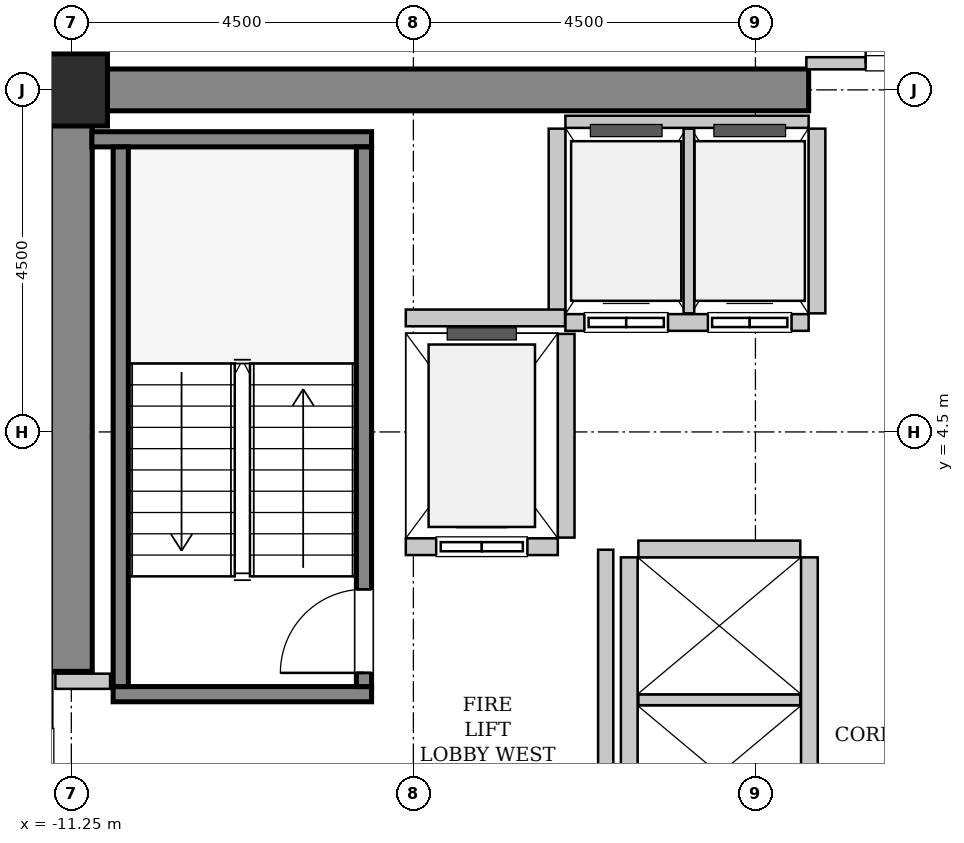
"""IFC4 building model, lengths in metres.
Left out: names, types, materials, properties, quantities, classifications, styles, units other than length and angle.
Written with IfcOpenShell. Run it as: python <this file> out.ifc"""

import sys

from ifc_helpers import new_model, si_unit, direction, frame, frame_2d, origin, origin_2d, place, context, subcontext, project, spatial, rectangle, hollow_rectangle, extrude, source, transform, mapped, element, fill, save


model = new_model("IFC4")
c1 = context("Model", 3, precision=1e-05, world=origin(), true_north=direction((0.0, 1.0)))
c2 = subcontext(c1, "Body", "Model", "MODEL_VIEW")
j1 = project(units=[si_unit("LENGTHUNIT", "METRE"), si_unit("PLANEANGLEUNIT", "RADIAN")], contexts=[c1])
p1 = place(None, origin())
s1 = spatial("IfcSite", under=j1, at=p1, CompositionType="ELEMENT")
p2 = place(p1, origin())
s2 = spatial("IfcBuilding", under=s1, at=p2, CompositionType="ELEMENT")
p3 = place(p2, frame((0.0, 0.0, 136.4)))
s3 = spatial("IfcBuildingStorey", under=s2, at=p3, CompositionType="ELEMENT", Elevation=136.4)
m1 = source(origin(), c2, "Body", "SweptSolid", [
    extrude(rectangle(XDim=9.975, YDim=0.55, at=frame_2d((4.987, 0.0))), origin(), (0.0, 0.0, 1.0), 3.8),
])
p4 = place(p3, frame((-11.525, 9.0, 0.0), z_axis=(0.0, 0.0, 1.0), x_axis=(1.0, 0.0, 0.0)))
e1 = element("IfcWall", 1, at=p4, inside=s3, PredefinedType="SHEAR", context=c2, shape_type="MappedRepresentation", body=[
    mapped(m1, transform((0.0, 0.0, 0.0), x_axis=(1.0, 0.0, 0.0), y_axis=(0.0, 1.0, 0.0), z_axis=(0.0, 0.0, 1.0), scale=1.0)),
])
m2 = source(origin(), c2, "Body", "SweptSolid", [
    extrude(rectangle(XDim=7.375, YDim=0.55, at=frame_2d((3.688, 0.0))), origin(), (0.0, 0.0, 1.0), 3.8),
])
p5 = place(p3, frame((-11.25, 1.35, 0.0), z_axis=(0.0, 0.0, 1.0), x_axis=(0.0, 1.0, 0.0)))
e2 = element("IfcWall", 2, at=p5, inside=s3, PredefinedType="SHEAR", context=c2, shape_type="MappedRepresentation", body=[
    mapped(m2, transform((0.0, 0.0, 0.0), x_axis=(1.0, 0.0, 0.0), y_axis=(0.0, 1.0, 0.0), z_axis=(0.0, 0.0, 1.0), scale=1.0)),
])
m3 = source(origin(), c2, "Body", "SweptSolid", [
    extrude(hollow_rectangle(XDim=0.95, YDim=0.95, WallThickness=0.045, InnerFilletRadius=0.045, OuterFilletRadius=0.09, at=origin_2d()), origin(), (0.0, 0.0, 1.0), 3.8),
])
p6 = place(p3, frame((-11.25, 9.0, 0.0), z_axis=(0.0, 0.0, 1.0), x_axis=(1.0, 0.0, 0.0)))
e3 = element("IfcColumn", 3, at=p6, inside=s3, PredefinedType="COLUMN", context=c2, shape_type="MappedRepresentation", body=[
    mapped(m3, transform((0.0, 0.0, 0.0), x_axis=(1.0, 0.0, 0.0), y_axis=(0.0, 1.0, 0.0), z_axis=(0.0, 0.0, 1.0), scale=1.0)),
])
m4 = source(origin(), c2, "Body", "SweptSolid", [
    extrude(rectangle(XDim=3.4, YDim=0.2, at=frame_2d((1.7, 0.0))), origin(), (0.0, 0.0, 1.0), 3.8),
])
p7 = place(p3, frame((-7.3, 1.05, 0.0), z_axis=(0.0, 0.0, 1.0), x_axis=(-1.0, 0.0, 0.0)))
e4 = element("IfcWall", 4, at=p7, inside=s3, PredefinedType="SOLIDWALL", context=c2, shape_type="MappedRepresentation", body=[
    mapped(m4, transform((0.0, 0.0, 0.0), x_axis=(1.0, 0.0, 0.0), y_axis=(0.0, 1.0, 0.0), z_axis=(0.0, 0.0, 1.0), scale=1.0)),
])
m5 = source(origin(), c2, "Body", "SweptSolid", [
    extrude(rectangle(XDim=3.68, YDim=0.2, at=frame_2d((1.84, 0.0))), origin(), (0.0, 0.0, 1.0), 3.8),
])
p8 = place(p3, frame((-7.3, 8.35, 0.0), z_axis=(0.0, 0.0, 1.0), x_axis=(-1.0, 0.0, 0.0)))
e5 = element("IfcWall", 5, at=p8, inside=s3, PredefinedType="SOLIDWALL", context=c2, shape_type="MappedRepresentation", body=[
    mapped(m5, transform((0.0, 0.0, 0.0), x_axis=(1.0, 0.0, 0.0), y_axis=(0.0, 1.0, 0.0), z_axis=(0.0, 0.0, 1.0), scale=1.0)),
])
m6 = source(origin(), c2, "Body", "SweptSolid", [
    extrude(rectangle(XDim=7.1, YDim=0.2, at=frame_2d((3.55, 0.0))), origin(), (0.0, 0.0, 1.0), 3.8),
])
p9 = place(p3, frame((-7.4, 1.15, 0.0), z_axis=(0.0, 0.0, 1.0), x_axis=(0.0, 1.0, 0.0)))
e6 = element("IfcWall", 6, at=p9, inside=s3, PredefinedType="SOLIDWALL", context=c2, shape_type="MappedRepresentation", body=[
    mapped(m6, transform((0.0, 0.0, 0.0), x_axis=(1.0, 0.0, 0.0), y_axis=(0.0, 1.0, 0.0), z_axis=(0.0, 0.0, 1.0), scale=1.0)),
])
p10 = place(p9, frame((0.18, 0.0, 0.0)))
e7 = element("IfcOpeningElement", 7, at=p10, cuts=e6, PredefinedType="OPENING", context=c2, shape_type="SweptSolid", body=[
    extrude(rectangle(XDim=1.1, YDim=2.15, at=frame_2d((0.55, 1.075))), frame((0.0, 0.11, 0.0), z_axis=(0.0, -1.0, 0.0), x_axis=(1.0, 0.0, 0.0)), (0.0, 0.0, 1.0), 0.22),
])
p11 = place(p3, frame((-10.6, 1.15, 0.0), z_axis=(0.0, 0.0, 1.0), x_axis=(0.0, 1.0, 0.0)))
e8 = element("IfcWall", 8, at=p11, inside=s3, PredefinedType="SOLIDWALL", context=c2, shape_type="MappedRepresentation", body=[
    mapped(m6, transform((0.0, 0.0, 0.0), x_axis=(1.0, 0.0, 0.0), y_axis=(0.0, 1.0, 0.0), z_axis=(0.0, 0.0, 1.0), scale=1.0)),
])
m7 = source(origin(), c2, "Body", "SweptSolid", [
    extrude(rectangle(XDim=2.0, YDim=0.22, at=frame_2d((1.0, 0.0))), origin(), (0.0, 0.0, 1.0), 3.535),
])
p12 = place(p3, frame((-6.85, 2.99, 0.0), z_axis=(0.0, 0.0, 1.0), x_axis=(1.0, 0.0, 0.0)))
e9 = element("IfcWall", 9, at=p12, inside=s3, PredefinedType="SOLIDWALL", context=c2, shape_type="MappedRepresentation", body=[
    mapped(m7, transform((0.0, 0.0, 0.0), x_axis=(1.0, 0.0, 0.0), y_axis=(0.0, 1.0, 0.0), z_axis=(0.0, 0.0, 1.0), scale=1.0)),
])
p13 = place(p12, frame((0.4, 0.0, 0.0)))
e10 = element("IfcOpeningElement", 10, at=p13, cuts=e9, PredefinedType="OPENING", context=c2, shape_type="SweptSolid", body=[
    extrude(rectangle(XDim=1.2, YDim=2.2, at=frame_2d((0.6, 1.1))), frame((0.0, 0.12, 0.0), z_axis=(0.0, -1.0, 0.0), x_axis=(1.0, 0.0, 0.0)), (0.0, 0.0, 1.0), 0.24),
])
m8 = source(origin(), c2, "Body", "SweptSolid", [
    extrude(rectangle(XDim=2.68, YDim=0.22, at=frame_2d((1.34, 0.0))), origin(), (0.0, 0.0, 1.0), 3.535),
])
p14 = place(p3, frame((-4.74, 3.11, 0.0), z_axis=(0.0, 0.0, 1.0), x_axis=(0.0, 1.0, 0.0)))
e11 = element("IfcWall", 11, at=p14, inside=s3, PredefinedType="SOLIDWALL", context=c2, shape_type="MappedRepresentation", body=[
    mapped(m8, transform((0.0, 0.0, 0.0), x_axis=(1.0, 0.0, 0.0), y_axis=(0.0, 1.0, 0.0), z_axis=(0.0, 0.0, 1.0), scale=1.0)),
])
m9 = source(origin(), c2, "Body", "SweptSolid", [
    extrude(rectangle(XDim=3.2, YDim=0.22, at=frame_2d((1.6, 0.0))), origin(), (0.0, 0.0, 1.0), 3.535),
])
p15 = place(p3, frame((-4.75, 5.94, 0.0), z_axis=(0.0, 0.0, 1.0), x_axis=(1.0, 0.0, 0.0)))
e12 = element("IfcWall", 12, at=p15, inside=s3, PredefinedType="SOLIDWALL", context=c2, shape_type="MappedRepresentation", body=[
    mapped(m9, transform((0.0, 0.0, 0.0), x_axis=(1.0, 0.0, 0.0), y_axis=(0.0, 1.0, 0.0), z_axis=(0.0, 0.0, 1.0), scale=1.0)),
])
p16 = place(p15, frame((0.25, 0.0, 0.0)))
e13 = element("IfcOpeningElement", 13, at=p16, cuts=e12, PredefinedType="OPENING", context=c2, shape_type="SweptSolid", body=[
    extrude(rectangle(XDim=1.1, YDim=2.2, at=frame_2d((0.55, 1.1))), frame((0.0, 0.12, 0.0), z_axis=(0.0, -1.0, 0.0), x_axis=(1.0, 0.0, 0.0)), (0.0, 0.0, 1.0), 0.24),
])
p17 = place(p15, frame((1.875, 0.0, 0.0)))
e14 = element("IfcOpeningElement", 14, at=p17, cuts=e12, PredefinedType="OPENING", context=c2, shape_type="SweptSolid", body=[
    extrude(rectangle(XDim=1.1, YDim=2.2, at=frame_2d((0.55, 1.1))), frame((0.0, 0.12, 0.0), z_axis=(0.0, -1.0, 0.0), x_axis=(1.0, 0.0, 0.0)), (0.0, 0.0, 1.0), 0.24),
])
m10 = source(origin(), c2, "Body", "SweptSolid", [
    extrude(rectangle(XDim=3.2, YDim=0.16, at=frame_2d((1.6, 0.0))), origin(), (0.0, 0.0, 1.0), 2.425),
])
p18 = place(p3, frame((-1.55, 8.58, 0.0), z_axis=(0.0, 0.0, 1.0), x_axis=(-1.0, 0.0, 0.0)))
e15 = element("IfcWall", 15, at=p18, inside=s3, PredefinedType="PARTITIONING", context=c2, shape_type="MappedRepresentation", body=[
    mapped(m10, transform((0.0, 0.0, 0.0), x_axis=(1.0, 0.0, 0.0), y_axis=(0.0, 1.0, 0.0), z_axis=(0.0, 0.0, 1.0), scale=1.0)),
])
m11 = source(origin(), c2, "Body", "SweptSolid", [
    extrude(rectangle(XDim=2.43, YDim=0.22, at=frame_2d((1.215, 0.0))), origin(), (0.0, 0.0, 1.0), 3.535),
])
p19 = place(p3, frame((-4.86, 8.49, 0.0), z_axis=(0.0, 0.0, 1.0), x_axis=(0.0, -1.0, 0.0)))
e16 = element("IfcWall", 16, at=p19, inside=s3, PredefinedType="SOLIDWALL", context=c2, shape_type="MappedRepresentation", body=[
    mapped(m11, transform((0.0, 0.0, 0.0), x_axis=(1.0, 0.0, 0.0), y_axis=(0.0, 1.0, 0.0), z_axis=(0.0, 0.0, 1.0), scale=1.0)),
])
m12 = source(origin(), c2, "Body", "SweptSolid", [
    extrude(rectangle(XDim=2.43, YDim=0.14, at=frame_2d((1.215, 0.0))), origin(), (0.0, 0.0, 1.0), 3.535),
])
p20 = place(p3, frame((-3.125, 6.06, 0.0), z_axis=(0.0, 0.0, 1.0), x_axis=(0.0, 1.0, 0.0)))
e17 = element("IfcWall", 17, at=p20, inside=s3, PredefinedType="PARTITIONING", context=c2, shape_type="MappedRepresentation", body=[
    mapped(m12, transform((0.0, 0.0, 0.0), x_axis=(1.0, 0.0, 0.0), y_axis=(0.0, 1.0, 0.0), z_axis=(0.0, 0.0, 1.0), scale=1.0)),
])
p21 = place(p3, frame((-1.44, 6.06, 0.0), z_axis=(0.0, 0.0, 1.0), x_axis=(0.0, 1.0, 0.0)))
e18 = element("IfcWall", 18, at=p21, inside=s3, PredefinedType="SOLIDWALL", context=c2, shape_type="MappedRepresentation", body=[
    mapped(m11, transform((0.0, 0.0, 0.0), x_axis=(1.0, 0.0, 0.0), y_axis=(0.0, 1.0, 0.0), z_axis=(0.0, 0.0, 1.0), scale=1.0)),
])
m13 = source(origin(), c2, "Body", "SweptSolid", [
    extrude(rectangle(XDim=5.7, YDim=0.22, at=frame_2d((2.85, 0.0))), origin(), (0.0, 0.0, 1.0), 3.535),
])
for number, where, z_axis, x_axis in (
    (19, (-1.54, -2.85, 0.0), (0.0, 0.0, 1.0), (0.0, 1.0, 0.0)),
    (20, (-3.91, 2.85, 0.0), (0.0, 0.0, 1.0), (0.0, -1.0, 0.0)),
):
    element("IfcWall", number, at=place(p3, frame(where, z_axis=z_axis, x_axis=x_axis)), inside=s3, PredefinedType="SOLIDWALL", context=c2, shape_type="MappedRepresentation", body=[
        mapped(m13, transform((0.0, 0.0, 0.0), x_axis=(1.0, 0.0, 0.0), y_axis=(0.0, 1.0, 0.0), z_axis=(0.0, 0.0, 1.0), scale=1.0)),
    ])
m14 = source(origin(), c2, "Body", "SweptSolid", [
    extrude(rectangle(XDim=2.13, YDim=0.14, at=frame_2d((1.065, 0.0))), origin(), (0.0, 0.0, 1.0), 3.535),
])
p22 = place(p3, frame((-3.79, 0.975, 0.0), z_axis=(0.0, 0.0, 1.0), x_axis=(1.0, 0.0, 0.0)))
e21 = element("IfcWall", 21, at=p22, inside=s3, PredefinedType="PARTITIONING", context=c2, shape_type="MappedRepresentation", body=[
    mapped(m14, transform((0.0, 0.0, 0.0), x_axis=(1.0, 0.0, 0.0), y_axis=(0.0, 1.0, 0.0), z_axis=(0.0, 0.0, 1.0), scale=1.0)),
])
m15 = source(origin(), c2, "Body", "SweptSolid", [
    extrude(rectangle(XDim=2.13, YDim=0.22, at=frame_2d((1.065, 0.0))), origin(), (0.0, 0.0, 1.0), 3.535),
])
p23 = place(p3, frame((-1.66, 2.96, 0.0), z_axis=(0.0, 0.0, 1.0), x_axis=(-1.0, 0.0, 0.0)))
e22 = element("IfcWall", 22, at=p23, inside=s3, PredefinedType="SOLIDWALL", context=c2, shape_type="MappedRepresentation", body=[
    mapped(m15, transform((0.0, 0.0, 0.0), x_axis=(1.0, 0.0, 0.0), y_axis=(0.0, 1.0, 0.0), z_axis=(0.0, 0.0, 1.0), scale=1.0)),
])
m16 = source(origin(), c2, "Body", "SweptSolid", [
    extrude(rectangle(XDim=2.095, YDim=0.22, at=frame_2d((1.048, 0.0))), origin(), (0.0, 0.0, 1.0), 3.535),
])
p24 = place(p3, frame((-6.85, 6.0, 0.0), z_axis=(0.0, 0.0, 1.0), x_axis=(1.0, 0.0, 0.0)))
e23 = element("IfcWall", 23, at=p24, inside=s3, PredefinedType="SOLIDWALL", context=c2, shape_type="MappedRepresentation", body=[
    mapped(m16, transform((0.0, 0.0, 0.0), x_axis=(1.0, 0.0, 0.0), y_axis=(0.0, 1.0, 0.0), z_axis=(0.0, 0.0, 1.0), scale=1.0)),
])
m17 = source(origin(), c2, "Body", "SweptSolid", [
    extrude(rectangle(XDim=5.9, YDim=0.2, at=frame_2d((2.95, 0.0))), origin(), (0.0, 0.0, 1.0), 3.535),
])
p25 = place(p3, frame((-4.22, -2.95, 0.0), z_axis=(0.0, 0.0, 1.0), x_axis=(0.0, 1.0, 0.0)))
e24 = element("IfcWall", 24, at=p25, inside=s3, PredefinedType="PARTITIONING", context=c2, shape_type="MappedRepresentation", body=[
    mapped(m17, transform((0.0, 0.0, 0.0), x_axis=(1.0, 0.0, 0.0), y_axis=(0.0, 1.0, 0.0), z_axis=(0.0, 0.0, 1.0), scale=1.0)),
])
m18 = source(origin(), c2, "Body", "SweptSolid", [
    extrude(rectangle(XDim=0.72, YDim=0.2, at=frame_2d((0.36, 0.0))), origin(), (0.0, 0.0, 1.0), 3.535),
])
p26 = place(p3, frame((-11.46, 1.22, 0.0), z_axis=(0.0, 0.0, 1.0), x_axis=(1.0, 0.0, 0.0)))
e25 = element("IfcWall", 25, at=p26, inside=s3, PredefinedType="PARTITIONING", context=c2, shape_type="MappedRepresentation", body=[
    mapped(m18, transform((0.0, 0.0, 0.0), x_axis=(1.0, 0.0, 0.0), y_axis=(0.0, 1.0, 0.0), z_axis=(0.0, 0.0, 1.0), scale=1.0)),
])
m19 = source(origin(), c2, "Body", "SweptSolid", [
    extrude(rectangle(XDim=3.16, YDim=0.16, at=frame_2d((1.58, 0.0))), origin(), (0.0, 0.0, 1.0), 2.425),
])
p27 = place(p3, frame((-1.58, 9.35, 0.0), z_axis=(0.0, 0.0, 1.0), x_axis=(1.0, 0.0, 0.0)))
e26 = element("IfcWall", 26, at=p27, inside=s3, PredefinedType="PARTITIONING", context=c2, shape_type="MappedRepresentation", body=[
    mapped(m19, transform((0.0, 0.0, 0.0), x_axis=(1.0, 0.0, 0.0), y_axis=(0.0, 1.0, 0.0), z_axis=(0.0, 0.0, 1.0), scale=1.0)),
])
p28 = place(p27, frame((0.78, 0.0, 0.0)))
e27 = element("IfcOpeningElement", 27, at=p28, cuts=e26, PredefinedType="OPENING", context=c2, shape_type="SweptSolid", body=[
    extrude(rectangle(XDim=1.6, YDim=2.3, at=frame_2d((0.8, 1.15))), frame((0.0, 0.09, 0.0), z_axis=(0.0, -1.0, 0.0), x_axis=(1.0, 0.0, 0.0)), (0.0, 0.0, 1.0), 0.18),
])
m20 = source(origin(), c2, "Body", "SweptSolid", [
    extrude(rectangle(XDim=1.1, YDim=2.15, at=frame_2d((0.55, 1.075))), frame((0.0, 0.025, 0.0), z_axis=(0.0, -1.0, 0.0), x_axis=(1.0, 0.0, 0.0)), (0.0, 0.0, 1.0), 0.05),
])
p29 = place(p10, origin())
e28 = element("IfcDoor", 28, at=p29, inside=s3, OperationType="SINGLE_SWING_LEFT", PredefinedType="DOOR", context=c2, shape_type="MappedRepresentation", body=[
    mapped(m20, transform((0.0, 0.0, 0.0), x_axis=(1.0, 0.0, 0.0), y_axis=(0.0, 1.0, 0.0), z_axis=(0.0, 0.0, 1.0), scale=1.0)),
])
fill(e7, e28)
m21 = source(origin(), c2, "Body", "SweptSolid", [
    extrude(rectangle(XDim=1.2, YDim=2.2, at=frame_2d((0.6, 1.1))), frame((0.0, 0.025, 0.0), z_axis=(0.0, -1.0, 0.0), x_axis=(1.0, 0.0, 0.0)), (0.0, 0.0, 1.0), 0.05),
])
p30 = place(p13, origin())
e29 = element("IfcDoor", 29, at=p30, inside=s3, OperationType="SLIDING_TO_LEFT", PredefinedType="DOOR", context=c2, shape_type="MappedRepresentation", body=[
    mapped(m21, transform((0.0, 0.0, 0.0), x_axis=(1.0, 0.0, 0.0), y_axis=(0.0, 1.0, 0.0), z_axis=(0.0, 0.0, 1.0), scale=1.0)),
])
fill(e10, e29)
m22 = source(origin(), c2, "Body", "SweptSolid", [
    extrude(rectangle(XDim=1.1, YDim=2.2, at=frame_2d((0.55, 1.1))), frame((0.0, 0.025, 0.0), z_axis=(0.0, -1.0, 0.0), x_axis=(1.0, 0.0, 0.0)), (0.0, 0.0, 1.0), 0.05),
])
p31 = place(p16, origin())
e30 = element("IfcDoor", 30, at=p31, inside=s3, OperationType="DOUBLE_DOOR_SLIDING", PredefinedType="DOOR", context=c2, shape_type="MappedRepresentation", body=[
    mapped(m22, transform((0.0, 0.0, 0.0), x_axis=(1.0, 0.0, 0.0), y_axis=(0.0, 1.0, 0.0), z_axis=(0.0, 0.0, 1.0), scale=1.0)),
])
fill(e13, e30)
p32 = place(p17, origin())
e31 = element("IfcDoor", 31, at=p32, inside=s3, OperationType="DOUBLE_DOOR_SLIDING", PredefinedType="DOOR", context=c2, shape_type="MappedRepresentation", body=[
    mapped(m22, transform((0.0, 0.0, 0.0), x_axis=(1.0, 0.0, 0.0), y_axis=(0.0, 1.0, 0.0), z_axis=(0.0, 0.0, 1.0), scale=1.0)),
])
fill(e14, e31)
m23 = source(origin(), c2, "Body", "SweptSolid", [
    extrude(rectangle(XDim=1.6, YDim=2.3, at=frame_2d((0.8, 1.15))), frame((0.0, 0.025, 0.0), z_axis=(0.0, -1.0, 0.0), x_axis=(1.0, 0.0, 0.0)), (0.0, 0.0, 1.0), 0.05),
])
p33 = place(p28, origin())
e32 = element("IfcDoor", 32, at=p33, inside=s3, OperationType="DOUBLE_DOOR_SINGLE_SWING", PredefinedType="DOOR", context=c2, shape_type="MappedRepresentation", body=[
    mapped(m23, transform((0.0, 0.0, 0.0), x_axis=(1.0, 0.0, 0.0), y_axis=(0.0, 1.0, 0.0), z_axis=(0.0, 0.0, 1.0), scale=1.0)),
])
fill(e27, e32)
save(model, sys.argv[1])
